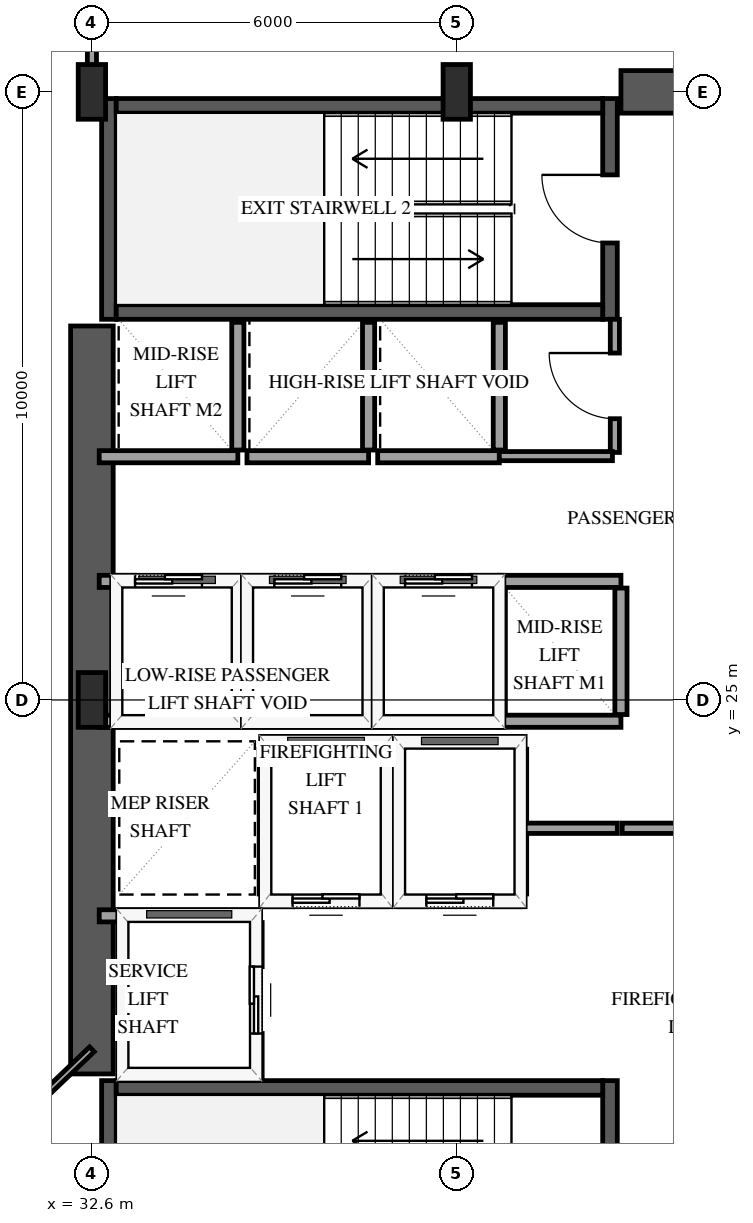
"""IFC4 building model, lengths in metres.
Left out: names, types, materials, properties, quantities, classifications, styles, units other than length and angle.
Written with IfcOpenShell. Run it as: python <this file> out.ifc"""

import sys

from ifc_helpers import new_model, si_unit, direction, frame, frame_2d, origin, origin_2d, place, context, subcontext, project, spatial, rectangle, extrude, element, fill, save


model = new_model("IFC4")
c1 = context("Model", 3, precision=1e-05, world=origin(), true_north=direction((0.0, 1.0)))
c2 = subcontext(c1, "Body", "Model", "MODEL_VIEW")
j1 = project(units=[si_unit("LENGTHUNIT", "METRE"), si_unit("PLANEANGLEUNIT", "RADIAN")], contexts=[c1])
p1 = place(None, origin())
s1 = spatial("IfcSite", under=j1, at=p1, CompositionType="ELEMENT")
p2 = place(p1, origin())
s2 = spatial("IfcBuilding", under=s1, at=p2, CompositionType="ELEMENT")
p3 = place(p2, frame((0.0, 0.0, 62.6)))
s3 = spatial("IfcBuildingStorey", under=s2, at=p3, CompositionType="ELEMENT", Elevation=62.6)
p4 = place(p3, frame((32.88, 15.11, 0.0), z_axis=(0.0, 0.0, 1.0), x_axis=(0.0, 1.0, 0.0)))
e1 = element("IfcWall", 1, at=p4, inside=s3, PredefinedType="SHEAR", context=c2, shape_type="SweptSolid", body=[
    extrude(rectangle(XDim=3.63, YDim=0.24, at=frame_2d((1.815, 0.0))), origin(), (0.0, 0.0, 1.0), 4.0),
])
p5 = place(p3, frame((41.12, 15.11, 0.0), z_axis=(0.0, 0.0, 1.0), x_axis=(0.0, 1.0, 0.0)))
e2 = element("IfcWall", 2, at=p5, inside=s3, PredefinedType="SHEAR", context=c2, shape_type="SweptSolid", body=[
    extrude(rectangle(XDim=3.63, YDim=0.24, at=frame_2d((1.815, 0.0))), origin(), (0.0, 0.0, 1.0), 4.0),
])
p6 = place(p5, frame((1.255, 0.0, 0.0)))
e3 = element("IfcOpeningElement", 3, at=p6, cuts=e2, PredefinedType="OPENING", context=c2, shape_type="SweptSolid", body=[
    extrude(rectangle(XDim=1.12, YDim=2.15, at=frame_2d((0.56, 1.075))), frame((0.0, 0.13, 0.0), z_axis=(0.0, -1.0, 0.0), x_axis=(1.0, 0.0, 0.0)), (0.0, 0.0, 1.0), 0.26),
])
p7 = place(p3, frame((33.0, 18.62, 0.0), z_axis=(0.0, 0.0, 1.0), x_axis=(1.0, 0.0, 0.0)))
e4 = element("IfcWall", 4, at=p7, inside=s3, PredefinedType="SHEAR", context=c2, shape_type="SweptSolid", body=[
    extrude(rectangle(XDim=8.0, YDim=0.24, at=frame_2d((4.0, 0.0))), origin(), (0.0, 0.0, 1.0), 4.0),
])
p8 = place(p3, frame((32.88, 31.26, 0.0), z_axis=(0.0, 0.0, 1.0), x_axis=(0.0, 1.0, 0.0)))
e5 = element("IfcWall", 5, at=p8, inside=s3, PredefinedType="SHEAR", context=c2, shape_type="SweptSolid", body=[
    extrude(rectangle(XDim=3.63, YDim=0.24, at=frame_2d((1.815, 0.0))), origin(), (0.0, 0.0, 1.0), 4.0),
])
p9 = place(p3, frame((41.12, 31.26, 0.0), z_axis=(0.0, 0.0, 1.0), x_axis=(0.0, 1.0, 0.0)))
e6 = element("IfcWall", 6, at=p9, inside=s3, PredefinedType="SHEAR", context=c2, shape_type="SweptSolid", body=[
    extrude(rectangle(XDim=3.63, YDim=0.24, at=frame_2d((1.815, 0.0))), origin(), (0.0, 0.0, 1.0), 4.0),
])
p10 = place(p9, frame((1.255, 0.0, 0.0)))
e7 = element("IfcOpeningElement", 7, at=p10, cuts=e6, PredefinedType="OPENING", context=c2, shape_type="SweptSolid", body=[
    extrude(rectangle(XDim=1.12, YDim=2.15, at=frame_2d((0.56, 1.075))), frame((0.0, 0.13, 0.0), z_axis=(0.0, -1.0, 0.0), x_axis=(1.0, 0.0, 0.0)), (0.0, 0.0, 1.0), 0.26),
])
for number, where, z_axis, x_axis in (
    (8, (33.0, 31.38, 0.0), (0.0, 0.0, 1.0), (1.0, 0.0, 0.0)),
    (9, (33.0, 34.77, 0.0), (0.0, 0.0, 1.0), (1.0, 0.0, 0.0)),
):
    element("IfcWall", number, at=place(p3, frame(where, z_axis=z_axis, x_axis=x_axis)), inside=s3, PredefinedType="SHEAR", context=c2, shape_type="SweptSolid", body=[
        extrude(rectangle(XDim=8.0, YDim=0.24, at=frame_2d((4.0, 0.0))), origin(), (0.0, 0.0, 1.0), 4.0),
    ])
p11 = place(p3, frame((32.6, 18.85, 0.0), z_axis=(0.0, 0.0, 1.0), x_axis=(0.0, 1.0, 0.0)))
e10 = element("IfcWall", 10, at=p11, inside=s3, PredefinedType="SHEAR", context=c2, shape_type="SweptSolid", body=[
    extrude(rectangle(XDim=12.3, YDim=0.7, at=frame_2d((6.15, 0.0))), origin(), (0.0, 0.0, 1.0), 4.0),
])
p12 = place(p3, frame((41.3, 35.0, 0.0), z_axis=(0.0, 0.0, 1.0), x_axis=(1.0, 0.0, 0.0)))
e11 = element("IfcWall", 11, at=p12, inside=s3, PredefinedType="SHEAR", context=c2, shape_type="SweptSolid", body=[
    extrude(rectangle(XDim=2.85, YDim=0.7, at=frame_2d((1.425, 0.0))), origin(), (0.0, 0.0, 1.0), 4.0),
])
for number, where, z_axis, x_axis in (
    (12, (32.6, 25.0, 0.0), (0.0, 0.0, 1.0), (1.0, 0.0, 0.0)),
    (13, (32.6, 35.0, 0.0), (0.0, 0.0, 1.0), (1.0, 0.0, 0.0)),
    (14, (38.6, 35.0, 0.0), (0.0, 0.0, 1.0), (1.0, 0.0, 0.0)),
):
    element("IfcColumn", number, at=place(p3, frame(where, z_axis=z_axis, x_axis=x_axis)), inside=s3, PredefinedType="PILASTER", context=c2, shape_type="SweptSolid", body=[
        extrude(rectangle(XDim=0.45, YDim=0.9, at=origin_2d()), origin(), (0.0, 0.0, 1.0), 4.0),
    ])
p13 = place(p3, frame((35.45, 21.7, 0.0), z_axis=(0.0, 0.0, 1.0), x_axis=(1.0, 0.0, 0.0)))
e15 = element("IfcWall", 15, at=p13, inside=s3, PredefinedType="SOLIDWALL", context=c2, shape_type="SweptSolid", body=[
    extrude(rectangle(XDim=2.0, YDim=0.2, at=frame_2d((1.0, 0.0))), origin(), (0.0, 0.0, 1.0), 3.7),
])
p14 = place(p13, frame((0.45, 0.0, 0.0)))
e16 = element("IfcOpeningElement", 16, at=p14, cuts=e15, PredefinedType="OPENING", context=c2, shape_type="SweptSolid", body=[
    extrude(rectangle(XDim=1.1, YDim=2.15, at=frame_2d((0.55, 1.075))), frame((0.0, 0.11, 0.0), z_axis=(0.0, -1.0, 0.0), x_axis=(1.0, 0.0, 0.0)), (0.0, 0.0, 1.0), 0.22),
])
p15 = place(p3, frame((35.45, 24.3, 0.0), z_axis=(0.0, 0.0, 1.0), x_axis=(1.0, 0.0, 0.0)))
e17 = element("IfcWall", 17, at=p15, inside=s3, PredefinedType="SOLIDWALL", context=c2, shape_type="SweptSolid", body=[
    extrude(rectangle(XDim=2.0, YDim=0.2, at=frame_2d((1.0, 0.0))), origin(), (0.0, 0.0, 1.0), 3.7),
])
for number, where, z_axis, x_axis in (
    (18, (35.45, 21.81, 0.0), (0.0, 0.0, 1.0), (0.0, 1.0, 0.0)),
    (19, (37.45, 21.81, 0.0), (0.0, 0.0, 1.0), (0.0, 1.0, 0.0)),
):
    element("IfcWall", number, at=place(p3, frame(where, z_axis=z_axis, x_axis=x_axis)), inside=s3, PredefinedType="SOLIDWALL", context=c2, shape_type="SweptSolid", body=[
        extrude(rectangle(XDim=2.38, YDim=0.2, at=frame_2d((1.19, 0.0))), origin(), (0.0, 0.0, 1.0), 3.7),
    ])
p16 = place(p3, frame((37.65, 21.7, 0.0), z_axis=(0.0, 0.0, 1.0), x_axis=(1.0, 0.0, 0.0)))
e20 = element("IfcWall", 20, at=p16, inside=s3, PredefinedType="SOLIDWALL", context=c2, shape_type="SweptSolid", body=[
    extrude(rectangle(XDim=2.0, YDim=0.2, at=frame_2d((1.0, 0.0))), origin(), (0.0, 0.0, 1.0), 3.7),
])
p17 = place(p16, frame((0.45, 0.0, 0.0)))
e21 = element("IfcOpeningElement", 21, at=p17, cuts=e20, PredefinedType="OPENING", context=c2, shape_type="SweptSolid", body=[
    extrude(rectangle(XDim=1.1, YDim=2.15, at=frame_2d((0.55, 1.075))), frame((0.0, 0.11, 0.0), z_axis=(0.0, -1.0, 0.0), x_axis=(1.0, 0.0, 0.0)), (0.0, 0.0, 1.0), 0.22),
])
p18 = place(p3, frame((37.65, 24.3, 0.0), z_axis=(0.0, 0.0, 1.0), x_axis=(1.0, 0.0, 0.0)))
e22 = element("IfcWall", 22, at=p18, inside=s3, PredefinedType="SOLIDWALL", context=c2, shape_type="SweptSolid", body=[
    extrude(rectangle(XDim=2.0, YDim=0.2, at=frame_2d((1.0, 0.0))), origin(), (0.0, 0.0, 1.0), 3.7),
])
p19 = place(p3, frame((39.65, 21.81, 0.0), z_axis=(0.0, 0.0, 1.0), x_axis=(0.0, 1.0, 0.0)))
e23 = element("IfcWall", 23, at=p19, inside=s3, PredefinedType="SOLIDWALL", context=c2, shape_type="SweptSolid", body=[
    extrude(rectangle(XDim=2.38, YDim=0.2, at=frame_2d((1.19, 0.0))), origin(), (0.0, 0.0, 1.0), 3.7),
])
p20 = place(p3, frame((32.72, 21.45, 0.0), z_axis=(0.0, 0.0, 1.0), x_axis=(1.0, 0.0, 0.0)))
e24 = element("IfcWall", 24, at=p20, inside=s3, PredefinedType="SOLIDWALL", context=c2, shape_type="SweptSolid", body=[
    extrude(rectangle(XDim=2.58, YDim=0.2, at=frame_2d((1.29, 0.0))), origin(), (0.0, 0.0, 1.0), 3.7),
])
p21 = place(p3, frame((35.3, 18.79, 0.0), z_axis=(0.0, 0.0, 1.0), x_axis=(0.0, 1.0, 0.0)))
e25 = element("IfcWall", 25, at=p21, inside=s3, PredefinedType="SOLIDWALL", context=c2, shape_type="SweptSolid", body=[
    extrude(rectangle(XDim=2.55, YDim=0.2, at=frame_2d((1.275, 0.0))), origin(), (0.0, 0.0, 1.0), 3.7),
])
p22 = place(p21, frame((0.725, 0.0, 0.0)))
e26 = element("IfcOpeningElement", 26, at=p22, cuts=e25, PredefinedType="OPENING", context=c2, shape_type="SweptSolid", body=[
    extrude(rectangle(XDim=1.1, YDim=2.15, at=frame_2d((0.55, 1.075))), frame((0.0, 0.11, 0.0), z_axis=(0.0, -1.0, 0.0), x_axis=(1.0, 0.0, 0.0)), (0.0, 0.0, 1.0), 0.22),
])
p23 = place(p3, frame((32.72, 24.65, 0.0), z_axis=(0.0, 0.0, 1.0), x_axis=(1.0, 0.0, 0.0)))
e27 = element("IfcWall", 27, at=p23, inside=s3, PredefinedType="SOLIDWALL", context=c2, shape_type="SweptSolid", body=[
    extrude(rectangle(XDim=2.28, YDim=0.2, at=frame_2d((1.14, 0.0))), origin(), (0.0, 0.0, 1.0), 3.7),
])
p24 = place(p3, frame((32.72, 26.95, 0.0), z_axis=(0.0, 0.0, 1.0), x_axis=(1.0, 0.0, 0.0)))
e28 = element("IfcWall", 28, at=p24, inside=s3, PredefinedType="SOLIDWALL", context=c2, shape_type="SweptSolid", body=[
    extrude(rectangle(XDim=2.28, YDim=0.2, at=frame_2d((1.14, 0.0))), origin(), (0.0, 0.0, 1.0), 3.7),
])
p25 = place(p24, frame((0.59, 0.0, 0.0)))
e29 = element("IfcOpeningElement", 29, at=p25, cuts=e28, PredefinedType="OPENING", context=c2, shape_type="SweptSolid", body=[
    extrude(rectangle(XDim=1.1, YDim=2.15, at=frame_2d((0.55, 1.075))), frame((0.0, 0.11, 0.0), z_axis=(0.0, -1.0, 0.0), x_axis=(1.0, 0.0, 0.0)), (0.0, 0.0, 1.0), 0.22),
])
p26 = place(p3, frame((35.0, 24.76, 0.0), z_axis=(0.0, 0.0, 1.0), x_axis=(0.0, 1.0, 0.0)))
e30 = element("IfcWall", 30, at=p26, inside=s3, PredefinedType="SOLIDWALL", context=c2, shape_type="SweptSolid", body=[
    extrude(rectangle(XDim=2.08, YDim=0.2, at=frame_2d((1.04, 0.0))), origin(), (0.0, 0.0, 1.0), 3.7),
])
p27 = place(p3, frame((35.15, 24.65, 0.0), z_axis=(0.0, 0.0, 1.0), x_axis=(1.0, 0.0, 0.0)))
e31 = element("IfcWall", 31, at=p27, inside=s3, PredefinedType="SOLIDWALL", context=c2, shape_type="SweptSolid", body=[
    extrude(rectangle(XDim=2.0, YDim=0.2, at=frame_2d((1.0, 0.0))), origin(), (0.0, 0.0, 1.0), 3.7),
])
p28 = place(p3, frame((35.15, 26.95, 0.0), z_axis=(0.0, 0.0, 1.0), x_axis=(1.0, 0.0, 0.0)))
e32 = element("IfcWall", 32, at=p28, inside=s3, PredefinedType="SOLIDWALL", context=c2, shape_type="SweptSolid", body=[
    extrude(rectangle(XDim=2.0, YDim=0.2, at=frame_2d((1.0, 0.0))), origin(), (0.0, 0.0, 1.0), 3.7),
])
p29 = place(p28, frame((0.45, 0.0, 0.0)))
e33 = element("IfcOpeningElement", 33, at=p29, cuts=e32, PredefinedType="OPENING", context=c2, shape_type="SweptSolid", body=[
    extrude(rectangle(XDim=1.1, YDim=2.15, at=frame_2d((0.55, 1.075))), frame((0.0, 0.11, 0.0), z_axis=(0.0, -1.0, 0.0), x_axis=(1.0, 0.0, 0.0)), (0.0, 0.0, 1.0), 0.22),
])
p30 = place(p3, frame((37.15, 24.76, 0.0), z_axis=(0.0, 0.0, 1.0), x_axis=(0.0, 1.0, 0.0)))
e34 = element("IfcWall", 34, at=p30, inside=s3, PredefinedType="SOLIDWALL", context=c2, shape_type="SweptSolid", body=[
    extrude(rectangle(XDim=2.08, YDim=0.2, at=frame_2d((1.04, 0.0))), origin(), (0.0, 0.0, 1.0), 3.7),
])
p31 = place(p3, frame((37.3, 24.65, 0.0), z_axis=(0.0, 0.0, 1.0), x_axis=(1.0, 0.0, 0.0)))
e35 = element("IfcWall", 35, at=p31, inside=s3, PredefinedType="SOLIDWALL", context=c2, shape_type="SweptSolid", body=[
    extrude(rectangle(XDim=2.0, YDim=0.2, at=frame_2d((1.0, 0.0))), origin(), (0.0, 0.0, 1.0), 3.7),
])
p32 = place(p3, frame((37.3, 26.95, 0.0), z_axis=(0.0, 0.0, 1.0), x_axis=(1.0, 0.0, 0.0)))
e36 = element("IfcWall", 36, at=p32, inside=s3, PredefinedType="SOLIDWALL", context=c2, shape_type="SweptSolid", body=[
    extrude(rectangle(XDim=2.0, YDim=0.2, at=frame_2d((1.0, 0.0))), origin(), (0.0, 0.0, 1.0), 3.7),
])
p33 = place(p32, frame((0.45, 0.0, 0.0)))
e37 = element("IfcOpeningElement", 37, at=p33, cuts=e36, PredefinedType="OPENING", context=c2, shape_type="SweptSolid", body=[
    extrude(rectangle(XDim=1.1, YDim=2.15, at=frame_2d((0.55, 1.075))), frame((0.0, 0.11, 0.0), z_axis=(0.0, -1.0, 0.0), x_axis=(1.0, 0.0, 0.0)), (0.0, 0.0, 1.0), 0.22),
])
p34 = place(p3, frame((39.3, 24.76, 0.0), z_axis=(0.0, 0.0, 1.0), x_axis=(0.0, 1.0, 0.0)))
e38 = element("IfcWall", 38, at=p34, inside=s3, PredefinedType="SOLIDWALL", context=c2, shape_type="SweptSolid", body=[
    extrude(rectangle(XDim=2.08, YDim=0.2, at=frame_2d((1.04, 0.0))), origin(), (0.0, 0.0, 1.0), 3.7),
])
for number, where, z_axis, x_axis in (
    (39, (39.3, 24.65, 0.0), (0.0, 0.0, 1.0), (1.0, 0.0, 0.0)),
    (40, (39.3, 26.95, 0.0), (0.0, 0.0, 1.0), (1.0, 0.0, 0.0)),
):
    element("IfcWall", number, at=place(p3, frame(where, z_axis=z_axis, x_axis=x_axis)), inside=s3, PredefinedType="SOLIDWALL", context=c2, shape_type="SweptSolid", body=[
        extrude(rectangle(XDim=2.0, YDim=0.2, at=frame_2d((1.0, 0.0))), origin(), (0.0, 0.0, 1.0), 3.7),
    ])
p35 = place(p3, frame((41.3, 24.76, 0.0), z_axis=(0.0, 0.0, 1.0), x_axis=(0.0, 1.0, 0.0)))
e41 = element("IfcWall", 41, at=p35, inside=s3, PredefinedType="SOLIDWALL", context=c2, shape_type="SweptSolid", body=[
    extrude(rectangle(XDim=2.08, YDim=0.2, at=frame_2d((1.04, 0.0))), origin(), (0.0, 0.0, 1.0), 3.7),
])
p36 = place(p3, frame((32.72, 29.0, 0.0), z_axis=(0.0, 0.0, 1.0), x_axis=(1.0, 0.0, 0.0)))
e42 = element("IfcWall", 42, at=p36, inside=s3, PredefinedType="SOLIDWALL", context=c2, shape_type="SweptSolid", body=[
    extrude(rectangle(XDim=2.28, YDim=0.2, at=frame_2d((1.14, 0.0))), origin(), (0.0, 0.0, 1.0), 3.7),
])
p37 = place(p3, frame((35.0, 29.11, 0.0), z_axis=(0.0, 0.0, 1.0), x_axis=(0.0, 1.0, 0.0)))
e43 = element("IfcWall", 43, at=p37, inside=s3, PredefinedType="SOLIDWALL", context=c2, shape_type="SweptSolid", body=[
    extrude(rectangle(XDim=2.1, YDim=0.2, at=frame_2d((1.05, 0.0))), origin(), (0.0, 0.0, 1.0), 3.7),
])
p38 = place(p3, frame((35.15, 29.0, 0.0), z_axis=(0.0, 0.0, 1.0), x_axis=(1.0, 0.0, 0.0)))
e44 = element("IfcWall", 44, at=p38, inside=s3, PredefinedType="SOLIDWALL", context=c2, shape_type="SweptSolid", body=[
    extrude(rectangle(XDim=2.0, YDim=0.2, at=frame_2d((1.0, 0.0))), origin(), (0.0, 0.0, 1.0), 3.7),
])
p39 = place(p3, frame((37.15, 29.11, 0.0), z_axis=(0.0, 0.0, 1.0), x_axis=(0.0, 1.0, 0.0)))
e45 = element("IfcWall", 45, at=p39, inside=s3, PredefinedType="SOLIDWALL", context=c2, shape_type="SweptSolid", body=[
    extrude(rectangle(XDim=2.1, YDim=0.2, at=frame_2d((1.05, 0.0))), origin(), (0.0, 0.0, 1.0), 3.7),
])
p40 = place(p3, frame((37.3, 29.0, 0.0), z_axis=(0.0, 0.0, 1.0), x_axis=(1.0, 0.0, 0.0)))
e46 = element("IfcWall", 46, at=p40, inside=s3, PredefinedType="SOLIDWALL", context=c2, shape_type="SweptSolid", body=[
    extrude(rectangle(XDim=2.0, YDim=0.2, at=frame_2d((1.0, 0.0))), origin(), (0.0, 0.0, 1.0), 3.7),
])
p41 = place(p3, frame((39.3, 29.11, 0.0), z_axis=(0.0, 0.0, 1.0), x_axis=(0.0, 1.0, 0.0)))
e47 = element("IfcWall", 47, at=p41, inside=s3, PredefinedType="SOLIDWALL", context=c2, shape_type="SweptSolid", body=[
    extrude(rectangle(XDim=2.1, YDim=0.2, at=frame_2d((1.05, 0.0))), origin(), (0.0, 0.0, 1.0), 3.7),
])
p42 = place(p3, frame((32.6, 19.255, 0.0), z_axis=(0.0, 0.0, 1.0), x_axis=(-0.722348754287, -0.691528941679, 0.0)))
e48 = element("IfcWall", 48, at=p42, inside=s3, PredefinedType="PARTITIONING", context=c2, shape_type="SweptSolid", body=[
    extrude(rectangle(XDim=6.496, YDim=0.11, at=frame_2d((3.248, 0.0))), origin(), (0.0, 0.0, 1.0), 3.7),
])
p43 = place(p3, frame((41.32, 22.89, 0.0), z_axis=(0.0, 0.0, 1.0), x_axis=(1.0, 0.0, 0.0)))
e49 = element("IfcWall", 49, at=p43, inside=s3, PredefinedType="PARTITIONING", context=c2, shape_type="SweptSolid", body=[
    extrude(rectangle(XDim=3.24, YDim=0.17, at=frame_2d((1.62, 0.0))), origin(), (0.0, 0.0, 1.0), 3.7),
])
p44 = place(p43, frame((1.08, 0.0, 0.0)))
e50 = element("IfcOpeningElement", 50, at=p44, cuts=e49, PredefinedType="OPENING", context=c2, shape_type="SweptSolid", body=[
    extrude(rectangle(XDim=1.08, YDim=2.15, at=frame_2d((0.54, 1.075))), frame((0.0, 0.095, 0.0), z_axis=(0.0, -1.0, 0.0), x_axis=(1.0, 0.0, 0.0)), (0.0, 0.0, 1.0), 0.19),
])
p45 = place(p3, frame((41.2, 29.07, 0.0), z_axis=(0.0, 0.0, 1.0), x_axis=(0.0, 1.0, 0.0)))
e51 = element("IfcWall", 51, at=p45, inside=s3, PredefinedType="PARTITIONING", context=c2, shape_type="SweptSolid", body=[
    extrude(rectangle(XDim=2.19, YDim=0.15, at=frame_2d((1.095, 0.0))), origin(), (0.0, 0.0, 1.0), 3.7),
])
p46 = place(p45, frame((0.555, 0.0, 0.0)))
e52 = element("IfcOpeningElement", 52, at=p46, cuts=e51, PredefinedType="OPENING", context=c2, shape_type="SweptSolid", body=[
    extrude(rectangle(XDim=1.08, YDim=2.15, at=frame_2d((0.54, 1.075))), frame((0.0, 0.085, 0.0), z_axis=(0.0, -1.0, 0.0), x_axis=(1.0, 0.0, 0.0)), (0.0, 0.0, 1.0), 0.17),
])
p47 = place(p3, frame((32.6, 35.07, 0.0), z_axis=(0.0, 0.0, 1.0), x_axis=(0.0, 1.0, 0.0)))
e53 = element("IfcWall", 53, at=p47, inside=s3, PredefinedType="PARTITIONING", context=c2, shape_type="SweptSolid", body=[
    extrude(rectangle(XDim=1.91, YDim=0.15, at=frame_2d((0.955, 0.0))), origin(), (0.0, 0.0, 1.0), 3.7),
])
p48 = place(p3, frame((39.3, 29.01, 0.0), z_axis=(0.0, 0.0, 1.0), x_axis=(1.0, 0.0, 0.0)))
e54 = element("IfcWall", 54, at=p48, inside=s3, PredefinedType="PARTITIONING", context=c2, shape_type="SweptSolid", body=[
    extrude(rectangle(XDim=1.86, YDim=0.15, at=frame_2d((0.93, 0.0))), origin(), (0.0, 0.0, 1.0), 3.7),
])
p49 = place(p3, frame((39.72, 22.89, 0.0), z_axis=(0.0, 0.0, 1.0), x_axis=(1.0, 0.0, 0.0)))
e55 = element("IfcWall", 55, at=p49, inside=s3, PredefinedType="PARTITIONING", context=c2, shape_type="SweptSolid", body=[
    extrude(rectangle(XDim=1.52, YDim=0.17, at=frame_2d((0.76, 0.0))), origin(), (0.0, 0.0, 1.0), 3.7),
])
p50 = place(p14, origin())
e56 = element("IfcDoor", 56, at=p50, inside=s3, OperationType="SLIDING_TO_LEFT", PredefinedType="DOOR", context=c2, shape_type="SweptSolid", body=[
    extrude(rectangle(XDim=1.1, YDim=2.15, at=frame_2d((0.55, 1.075))), frame((0.0, 0.025, 0.0), z_axis=(0.0, -1.0, 0.0), x_axis=(1.0, 0.0, 0.0)), (0.0, 0.0, 1.0), 0.05),
])
fill(e16, e56)
p51 = place(p17, origin())
e57 = element("IfcDoor", 57, at=p51, inside=s3, OperationType="SLIDING_TO_LEFT", PredefinedType="DOOR", context=c2, shape_type="SweptSolid", body=[
    extrude(rectangle(XDim=1.1, YDim=2.15, at=frame_2d((0.55, 1.075))), frame((0.0, 0.025, 0.0), z_axis=(0.0, -1.0, 0.0), x_axis=(1.0, 0.0, 0.0)), (0.0, 0.0, 1.0), 0.05),
])
fill(e21, e57)
p52 = place(p22, origin())
e58 = element("IfcDoor", 58, at=p52, inside=s3, OperationType="SLIDING_TO_LEFT", PredefinedType="DOOR", context=c2, shape_type="SweptSolid", body=[
    extrude(rectangle(XDim=1.1, YDim=2.15, at=frame_2d((0.55, 1.075))), frame((0.0, 0.025, 0.0), z_axis=(0.0, -1.0, 0.0), x_axis=(1.0, 0.0, 0.0)), (0.0, 0.0, 1.0), 0.05),
])
fill(e26, e58)
p53 = place(p25, origin())
e59 = element("IfcDoor", 59, at=p53, inside=s3, OperationType="SLIDING_TO_LEFT", PredefinedType="DOOR", context=c2, shape_type="SweptSolid", body=[
    extrude(rectangle(XDim=1.1, YDim=2.15, at=frame_2d((0.55, 1.075))), frame((0.0, 0.025, 0.0), z_axis=(0.0, -1.0, 0.0), x_axis=(1.0, 0.0, 0.0)), (0.0, 0.0, 1.0), 0.05),
])
fill(e29, e59)
p54 = place(p29, origin())
e60 = element("IfcDoor", 60, at=p54, inside=s3, OperationType="SLIDING_TO_LEFT", PredefinedType="DOOR", context=c2, shape_type="SweptSolid", body=[
    extrude(rectangle(XDim=1.1, YDim=2.15, at=frame_2d((0.55, 1.075))), frame((0.0, 0.025, 0.0), z_axis=(0.0, -1.0, 0.0), x_axis=(1.0, 0.0, 0.0)), (0.0, 0.0, 1.0), 0.05),
])
fill(e33, e60)
p55 = place(p33, origin())
e61 = element("IfcDoor", 61, at=p55, inside=s3, OperationType="SLIDING_TO_LEFT", PredefinedType="DOOR", context=c2, shape_type="SweptSolid", body=[
    extrude(rectangle(XDim=1.1, YDim=2.15, at=frame_2d((0.55, 1.075))), frame((0.0, 0.025, 0.0), z_axis=(0.0, -1.0, 0.0), x_axis=(1.0, 0.0, 0.0)), (0.0, 0.0, 1.0), 0.05),
])
fill(e37, e61)
p56 = place(p10, origin())
e62 = element("IfcDoor", 62, at=p56, inside=s3, OperationType="SINGLE_SWING_RIGHT", PredefinedType="DOOR", context=c2, shape_type="SweptSolid", body=[
    extrude(rectangle(XDim=1.12, YDim=2.15, at=frame_2d((0.56, 1.075))), frame((0.0, 0.025, 0.0), z_axis=(0.0, -1.0, 0.0), x_axis=(1.0, 0.0, 0.0)), (0.0, 0.0, 1.0), 0.05),
])
fill(e7, e62)
p57 = place(p46, origin())
e63 = element("IfcDoor", 63, at=p57, inside=s3, OperationType="SINGLE_SWING_RIGHT", PredefinedType="DOOR", context=c2, shape_type="SweptSolid", body=[
    extrude(rectangle(XDim=1.08, YDim=2.15, at=frame_2d((0.54, 1.075))), frame((0.0, 0.025, 0.0), z_axis=(0.0, -1.0, 0.0), x_axis=(1.0, 0.0, 0.0)), (0.0, 0.0, 1.0), 0.05),
])
fill(e52, e63)
save(model, sys.argv[1])
